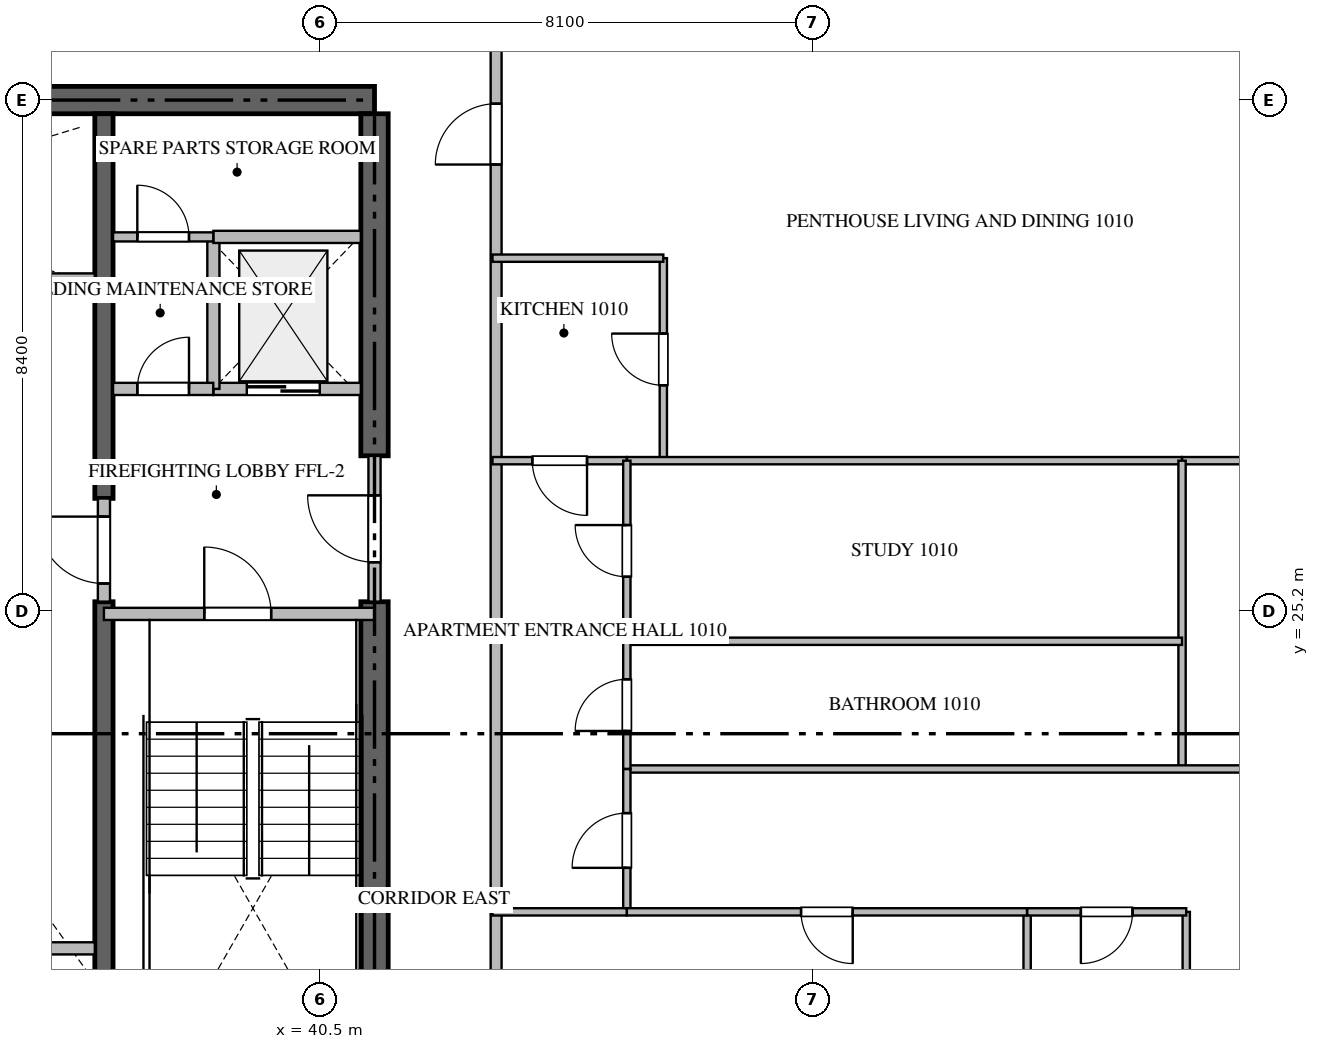
"""IFC4 building model, lengths in metres.
Left out: names, types, materials, properties, quantities, classifications, styles, units other than length and angle.
Written with IfcOpenShell. Run it as: python <this file> out.ifc"""

import sys

from ifc_helpers import new_model, si_unit, direction, frame, frame_2d, origin, place, context, subcontext, project, spatial, rectangle, extrude, source, transform, mapped, element, fill, save


model = new_model("IFC4")
c1 = context("Model", 3, precision=1e-05, world=origin(), true_north=direction((0.0, 1.0)))
c2 = subcontext(c1, "Body", "Model", "MODEL_VIEW")
j1 = project(units=[si_unit("LENGTHUNIT", "METRE"), si_unit("PLANEANGLEUNIT", "RADIAN")], contexts=[c1])
p1 = place(None, origin())
s1 = spatial("IfcSite", under=j1, at=p1, CompositionType="ELEMENT")
p2 = place(p1, origin())
s2 = spatial("IfcBuilding", under=s1, at=p2, CompositionType="ELEMENT")
p3 = place(p2, frame((0.0, 0.0, 45.45)))
s3 = spatial("IfcBuildingStorey", under=s2, at=p3, CompositionType="ELEMENT", Elevation=45.45)
p4 = place(p3, frame((41.4, 33.6, -0.26), z_axis=(0.0, 0.0, 1.0), x_axis=(-1.0, 0.0, 0.0)))
e1 = element("IfcWall", 1, at=p4, inside=s3, PredefinedType="SHEAR", context=c2, shape_type="SweptSolid", body=[
    extrude(rectangle(XDim=18.0, YDim=0.45, at=frame_2d((9.0, 0.0))), origin(), (0.0, 0.0, 1.0), 3.748),
])
p5 = place(p3, frame((41.4, 17.025, -0.26), z_axis=(0.0, 0.0, 1.0), x_axis=(0.0, 1.0, 0.0)))
e2 = element("IfcWall", 2, at=p5, inside=s3, PredefinedType="SHEAR", context=c2, shape_type="SweptSolid", body=[
    extrude(rectangle(XDim=8.325, YDim=0.45, at=frame_2d((4.163, 0.0))), origin(), (0.0, 0.0, 1.0), 3.748),
])
p6 = place(p3, frame((41.4, 27.75, -0.26), z_axis=(0.0, 0.0, 1.0), x_axis=(0.0, 1.0, 0.0)))
e3 = element("IfcWall", 3, at=p6, inside=s3, PredefinedType="SHEAR", context=c2, shape_type="SweptSolid", body=[
    extrude(rectangle(XDim=5.625, YDim=0.45, at=frame_2d((2.812, 0.0))), origin(), (0.0, 0.0, 1.0), 3.748),
])
p7 = place(p3, frame((36.95, 17.025, -0.26), z_axis=(0.0, 0.0, 1.0), x_axis=(0.0, 1.0, 0.0)))
e4 = element("IfcWall", 4, at=p7, inside=s3, PredefinedType="SHEAR", context=c2, shape_type="SweptSolid", body=[
    extrude(rectangle(XDim=8.325, YDim=0.3, at=frame_2d((4.163, 0.0))), origin(), (0.0, 0.0, 1.0), 3.748),
])
p8 = place(p3, frame((36.95, 27.05, -0.26), z_axis=(0.0, 0.0, 1.0), x_axis=(0.0, 1.0, 0.0)))
e5 = element("IfcWall", 5, at=p8, inside=s3, PredefinedType="SHEAR", context=c2, shape_type="SweptSolid", body=[
    extrude(rectangle(XDim=6.325, YDim=0.3, at=frame_2d((3.163, 0.0))), origin(), (0.0, 0.0, 1.0), 3.748),
])
p9 = place(p3, frame((36.95, 25.15, 0.0), z_axis=(0.0, 0.0, 1.0), x_axis=(1.0, 0.0, 0.0)))
e6 = element("IfcWall", 6, at=p9, inside=s3, PredefinedType="STANDARD", context=c2, shape_type="SweptSolid", body=[
    extrude(rectangle(XDim=4.45, YDim=0.2, at=frame_2d((2.225, 0.0))), origin(), (0.0, 0.0, 1.0), 3.49),
])
p10 = place(p9, frame((1.65, 0.0, 0.0)))
e7 = element("IfcOpeningElement", 7, at=p10, cuts=e6, PredefinedType="OPENING", context=c2, shape_type="SweptSolid", body=[
    extrude(rectangle(XDim=1.1, YDim=2.15, at=frame_2d((0.55, 1.075))), frame((0.0, 0.11, 0.0), z_axis=(0.0, -1.0, 0.0), x_axis=(1.0, 0.0, 0.0)), (0.0, 0.0, 1.0), 0.22),
])
p11 = place(p3, frame((38.75, 28.85, 0.0), z_axis=(0.0, 0.0, 1.0), x_axis=(1.0, 0.0, 0.0)))
e8 = element("IfcWall", 8, at=p11, inside=s3, PredefinedType="STANDARD", context=c2, shape_type="SweptSolid", body=[
    extrude(rectangle(XDim=2.425, YDim=0.2, at=frame_2d((1.212, 0.0))), origin(), (0.0, 0.0, 1.0), 3.49),
])
p12 = place(p11, frame((0.55, 0.0, 0.0)))
e9 = element("IfcOpeningElement", 9, at=p12, cuts=e8, PredefinedType="OPENING", context=c2, shape_type="SweptSolid", body=[
    extrude(rectangle(XDim=1.2, YDim=2.2, at=frame_2d((0.6, 1.1))), frame((0.0, 0.11, 0.0), z_axis=(0.0, -1.0, 0.0), x_axis=(1.0, 0.0, 0.0)), (0.0, 0.0, 1.0), 0.22),
])
p13 = place(p3, frame((33.05, 19.65, 0.0), z_axis=(0.0, 0.0, 1.0), x_axis=(1.0, 0.0, 0.0)))
e10 = element("IfcWall", 10, at=p13, inside=s3, PredefinedType="STANDARD", context=c2, shape_type="SweptSolid", body=[
    extrude(rectangle(XDim=3.75, YDim=0.2, at=frame_2d((1.875, 0.0))), origin(), (0.0, 0.0, 1.0), 3.49),
])
p14 = place(p13, frame((0.65, 0.0, 0.0)))
e11 = element("IfcOpeningElement", 11, at=p14, cuts=e10, PredefinedType="OPENING", context=c2, shape_type="SweptSolid", body=[
    extrude(rectangle(XDim=1.1, YDim=2.2, at=frame_2d((0.55, 1.1))), frame((0.0, 0.11, 0.0), z_axis=(0.0, -1.0, 0.0), x_axis=(1.0, 0.0, 0.0)), (0.0, 0.0, 1.0), 0.22),
])
p15 = place(p3, frame((35.0, 30.65, 0.0), z_axis=(0.0, 0.0, 1.0), x_axis=(1.0, 0.0, 0.0)))
e12 = element("IfcWall", 12, at=p15, inside=s3, PredefinedType="STANDARD", context=c2, shape_type="SweptSolid", body=[
    extrude(rectangle(XDim=1.8, YDim=0.2, at=frame_2d((0.9, 0.0))), origin(), (0.0, 0.0, 1.0), 3.49),
])
p16 = place(p3, frame((38.75, 28.85, 0.0), z_axis=(0.0, 0.0, 1.0), x_axis=(0.0, 1.0, 0.0)))
e13 = element("IfcWall", 13, at=p16, inside=s3, PredefinedType="STANDARD", context=c2, shape_type="SweptSolid", body=[
    extrude(rectangle(XDim=2.5, YDim=0.2, at=frame_2d((1.25, 0.0))), origin(), (0.0, 0.0, 1.0), 3.49),
])
p17 = place(p3, frame((38.75, 31.35, 0.0), z_axis=(0.0, 0.0, 1.0), x_axis=(1.0, 0.0, 0.0)))
e14 = element("IfcWall", 14, at=p17, inside=s3, PredefinedType="STANDARD", context=c2, shape_type="SweptSolid", body=[
    extrude(rectangle(XDim=2.425, YDim=0.2, at=frame_2d((1.212, 0.0))), origin(), (0.0, 0.0, 1.0), 3.49),
])
p18 = place(p3, frame((37.1, 28.85, 0.0), z_axis=(0.0, 0.0, 1.0), x_axis=(1.0, 0.0, 0.0)))
e15 = element("IfcWall", 15, at=p18, inside=s3, PredefinedType="STANDARD", context=c2, shape_type="SweptSolid", body=[
    extrude(rectangle(XDim=1.648, YDim=0.2, at=frame_2d((0.824, 0.0))), origin(), (0.0, 0.0, 1.0), 3.49),
])
p19 = place(p18, frame((0.399, 0.0, 0.0)))
e16 = element("IfcOpeningElement", 16, at=p19, cuts=e15, PredefinedType="OPENING", context=c2, shape_type="SweptSolid", body=[
    extrude(rectangle(XDim=0.85, YDim=2.1, at=frame_2d((0.425, 1.05))), frame((0.0, 0.11, 0.0), z_axis=(0.0, -1.0, 0.0), x_axis=(1.0, 0.0, 0.0)), (0.0, 0.0, 1.0), 0.22),
])
p20 = place(p3, frame((41.4, 25.352, 0.0), z_axis=(0.0, 0.0, 1.0), x_axis=(0.0, 1.0, 0.0)))
e17 = element("IfcWall", 17, at=p20, inside=s3, PredefinedType="STANDARD", context=c2, shape_type="SweptSolid", body=[
    extrude(rectangle(XDim=2.396, YDim=0.2, at=frame_2d((1.198, 0.0))), origin(), (0.0, 0.0, 1.0), 3.49),
])
p21 = place(p20, frame((0.648, 0.0, 0.0)))
e18 = element("IfcOpeningElement", 18, at=p21, cuts=e17, PredefinedType="OPENING", context=c2, shape_type="SweptSolid", body=[
    extrude(rectangle(XDim=1.1, YDim=2.15, at=frame_2d((0.55, 1.075))), frame((0.0, 0.11, 0.0), z_axis=(0.0, -1.0, 0.0), x_axis=(1.0, 0.0, 0.0)), (0.0, 0.0, 1.0), 0.22),
])
p22 = place(p3, frame((36.95, 25.352, 0.0), z_axis=(0.0, 0.0, 1.0), x_axis=(0.0, 1.0, 0.0)))
e19 = element("IfcWall", 19, at=p22, inside=s3, PredefinedType="STANDARD", context=c2, shape_type="SweptSolid", body=[
    extrude(rectangle(XDim=1.696, YDim=0.2, at=frame_2d((0.848, 0.0))), origin(), (0.0, 0.0, 1.0), 3.49),
])
p23 = place(p22, frame((0.298, 0.0, 0.0)))
e20 = element("IfcOpeningElement", 20, at=p23, cuts=e19, PredefinedType="OPENING", context=c2, shape_type="SweptSolid", body=[
    extrude(rectangle(XDim=1.1, YDim=2.15, at=frame_2d((0.55, 1.075))), frame((0.0, 0.11, 0.0), z_axis=(0.0, -1.0, 0.0), x_axis=(1.0, 0.0, 0.0)), (0.0, 0.0, 1.0), 0.22),
])
p24 = place(p3, frame((37.1, 31.35, 0.0), z_axis=(0.0, 0.0, 1.0), x_axis=(1.0, 0.0, 0.0)))
e21 = element("IfcWall", 21, at=p24, inside=s3, PredefinedType="PARTITIONING", context=c2, shape_type="SweptSolid", body=[
    extrude(rectangle(XDim=1.648, YDim=0.15, at=frame_2d((0.824, 0.0))), origin(), (0.0, 0.0, 1.0), 3.49),
])
p25 = place(p24, frame((0.399, 0.0, 0.0)))
e22 = element("IfcOpeningElement", 22, at=p25, cuts=e21, PredefinedType="OPENING", context=c2, shape_type="SweptSolid", body=[
    extrude(rectangle(XDim=0.85, YDim=2.1, at=frame_2d((0.425, 1.05))), frame((0.0, 0.085, 0.0), z_axis=(0.0, -1.0, 0.0), x_axis=(1.0, 0.0, 0.0)), (0.0, 0.0, 1.0), 0.17),
])
p26 = place(p3, frame((43.4, 14.9, 0.0), z_axis=(0.0, 0.0, 1.0), x_axis=(0.0, 1.0, 0.0)))
e23 = element("IfcWall", 23, at=p26, inside=s3, PredefinedType="PARTITIONING", context=c2, shape_type="SweptSolid", body=[
    extrude(rectangle(XDim=20.6, YDim=0.18, at=frame_2d((10.3, 0.0))), origin(), (0.0, 0.0, 1.0), 3.49),
])
p27 = place(p26, frame((17.64, 0.0, 0.0)))
e24 = element("IfcOpeningElement", 24, at=p27, cuts=e23, PredefinedType="OPENING", context=c2, shape_type="SweptSolid", body=[
    extrude(rectangle(XDim=1.0, YDim=2.15, at=frame_2d((0.5, 1.075))), frame((0.0, 0.1, 0.0), z_axis=(0.0, -1.0, 0.0), x_axis=(1.0, 0.0, 0.0)), (0.0, 0.0, 1.0), 0.2),
])
p28 = place(p3, frame((46.15, 27.67, 0.0), z_axis=(0.0, 0.0, 1.0), x_axis=(0.0, 1.0, 0.0)))
e25 = element("IfcWall", 25, at=p28, inside=s3, PredefinedType="PARTITIONING", context=c2, shape_type="SweptSolid", body=[
    extrude(rectangle(XDim=3.33, YDim=0.12, at=frame_2d((1.665, 0.0))), origin(), (0.0, 0.0, 1.0), 3.49),
])
p29 = place(p28, frame((1.24, 0.0, 0.0)))
e26 = element("IfcOpeningElement", 26, at=p29, cuts=e25, PredefinedType="OPENING", context=c2, shape_type="SweptSolid", body=[
    extrude(rectangle(XDim=0.85, YDim=2.1, at=frame_2d((0.425, 1.05))), frame((0.0, 0.07, 0.0), z_axis=(0.0, -1.0, 0.0), x_axis=(1.0, 0.0, 0.0)), (0.0, 0.0, 1.0), 0.14),
])
p30 = place(p3, frame((46.15, 31.0, 0.0), z_axis=(0.0, 0.0, 1.0), x_axis=(-1.0, 0.0, 0.0)))
e27 = element("IfcWall", 27, at=p30, inside=s3, PredefinedType="PARTITIONING", context=c2, shape_type="SweptSolid", body=[
    extrude(rectangle(XDim=2.81, YDim=0.12, at=frame_2d((1.405, 0.0))), origin(), (0.0, 0.0, 1.0), 3.49),
])
p31 = place(p3, frame((45.55, 27.67, 0.0), z_axis=(0.0, 0.0, 1.0), x_axis=(-1.0, 0.0, 0.0)))
e28 = element("IfcWall", 28, at=p31, inside=s3, PredefinedType="PARTITIONING", context=c2, shape_type="SweptSolid", body=[
    extrude(rectangle(XDim=2.21, YDim=0.12, at=frame_2d((1.105, 0.0))), origin(), (0.0, 0.0, 1.0), 3.49),
])
p32 = place(p31, frame((0.655, 0.0, 0.0)))
e29 = element("IfcOpeningElement", 29, at=p32, cuts=e28, PredefinedType="OPENING", context=c2, shape_type="SweptSolid", body=[
    extrude(rectangle(XDim=0.9, YDim=2.1, at=frame_2d((0.45, 1.05))), frame((0.0, 0.07, 0.0), z_axis=(0.0, -1.0, 0.0), x_axis=(1.0, 0.0, 0.0)), (0.0, 0.0, 1.0), 0.14),
])
p33 = place(p3, frame((58.705, 27.67, 0.0), z_axis=(0.0, 0.0, 1.0), x_axis=(-1.0, 0.0, 0.0)))
e30 = element("IfcWall", 30, at=p33, inside=s3, PredefinedType="PARTITIONING", context=c2, shape_type="SweptSolid", body=[
    extrude(rectangle(XDim=4.024, YDim=0.12, at=frame_2d((2.012, 0.0))), origin(), (0.0, 0.0, 1.0), 3.49),
])
p34 = place(p33, frame((1.858, 0.0, 0.0)))
e31 = element("IfcOpeningElement", 31, at=p34, cuts=e30, PredefinedType="OPENING", context=c2, shape_type="SweptSolid", body=[
    extrude(rectangle(XDim=0.9, YDim=2.1, at=frame_2d((0.45, 1.05))), frame((0.0, 0.07, 0.0), z_axis=(0.0, -1.0, 0.0), x_axis=(1.0, 0.0, 0.0)), (0.0, 0.0, 1.0), 0.14),
])
p35 = place(p3, frame((54.679, 27.67, 0.0), z_axis=(0.0, 0.0, 1.0), x_axis=(-1.0, 0.0, 0.0)))
e32 = element("IfcWall", 32, at=p35, inside=s3, PredefinedType="PARTITIONING", context=c2, shape_type="SweptSolid", body=[
    extrude(rectangle(XDim=9.127, YDim=0.12, at=frame_2d((4.563, 0.0))), origin(), (0.0, 0.0, 1.0), 3.49),
])
p36 = place(p3, frame((54.681, 22.6, 0.0), z_axis=(0.0, 0.0, 1.0), x_axis=(0.0, 1.0, 0.0)))
e33 = element("IfcWall", 33, at=p36, inside=s3, PredefinedType="PARTITIONING", context=c2, shape_type="SweptSolid", body=[
    extrude(rectangle(XDim=5.07, YDim=0.12, at=frame_2d((2.535, 0.0))), origin(), (0.0, 0.0, 1.0), 3.49),
])
p37 = place(p3, frame((58.705, 22.6, 0.0), z_axis=(0.0, 0.0, 1.0), x_axis=(-1.0, 0.0, 0.0)))
e34 = element("IfcWall", 34, at=p37, inside=s3, PredefinedType="PARTITIONING", context=c2, shape_type="SweptSolid", body=[
    extrude(rectangle(XDim=13.155, YDim=0.12, at=frame_2d((6.578, 0.0))), origin(), (0.0, 0.0, 1.0), 3.49),
])
p38 = place(p3, frame((54.681, 24.7, 0.0), z_axis=(0.0, 0.0, 1.0), x_axis=(-1.0, 0.0, 0.0)))
e35 = element("IfcWall", 35, at=p38, inside=s3, PredefinedType="PARTITIONING", context=c2, shape_type="SweptSolid", body=[
    extrude(rectangle(XDim=9.131, YDim=0.12, at=frame_2d((4.565, 0.0))), origin(), (0.0, 0.0, 1.0), 3.49),
])
p39 = place(p3, frame((45.55, 22.6, 0.0), z_axis=(0.0, 0.0, 1.0), x_axis=(0.0, 1.0, 0.0)))
e36 = element("IfcWall", 36, at=p39, inside=s3, PredefinedType="PARTITIONING", context=c2, shape_type="SweptSolid", body=[
    extrude(rectangle(XDim=2.1, YDim=0.12, at=frame_2d((1.05, 0.0))), origin(), (0.0, 0.0, 1.0), 3.49),
])
p40 = place(p39, frame((0.625, 0.0, 0.0)))
e37 = element("IfcOpeningElement", 37, at=p40, cuts=e36, PredefinedType="OPENING", context=c2, shape_type="SweptSolid", body=[
    extrude(rectangle(XDim=0.85, YDim=2.1, at=frame_2d((0.425, 1.05))), frame((0.0, 0.07, 0.0), z_axis=(0.0, -1.0, 0.0), x_axis=(1.0, 0.0, 0.0)), (0.0, 0.0, 1.0), 0.14),
])
p41 = place(p3, frame((45.55, 24.702, 0.0), z_axis=(0.0, 0.0, 1.0), x_axis=(0.0, 1.0, 0.0)))
e38 = element("IfcWall", 38, at=p41, inside=s3, PredefinedType="PARTITIONING", context=c2, shape_type="SweptSolid", body=[
    extrude(rectangle(XDim=2.968, YDim=0.12, at=frame_2d((1.484, 0.0))), origin(), (0.0, 0.0, 1.0), 3.49),
])
p42 = place(p41, frame((1.059, 0.0, 0.0)))
e39 = element("IfcOpeningElement", 39, at=p42, cuts=e38, PredefinedType="OPENING", context=c2, shape_type="SweptSolid", body=[
    extrude(rectangle(XDim=0.85, YDim=2.1, at=frame_2d((0.425, 1.05))), frame((0.0, 0.07, 0.0), z_axis=(0.0, -1.0, 0.0), x_axis=(1.0, 0.0, 0.0)), (0.0, 0.0, 1.0), 0.14),
])
p43 = place(p3, frame((45.55, 20.25, 0.0), z_axis=(0.0, 0.0, 1.0), x_axis=(0.0, 1.0, 0.0)))
e40 = element("IfcWall", 40, at=p43, inside=s3, PredefinedType="PARTITIONING", context=c2, shape_type="SweptSolid", body=[
    extrude(rectangle(XDim=2.348, YDim=0.12, at=frame_2d((1.174, 0.0))), origin(), (0.0, 0.0, 1.0), 3.49),
])
p44 = place(p43, frame((0.724, 0.0, 0.0)))
e41 = element("IfcOpeningElement", 41, at=p44, cuts=e40, PredefinedType="OPENING", context=c2, shape_type="SweptSolid", body=[
    extrude(rectangle(XDim=0.9, YDim=2.1, at=frame_2d((0.45, 1.05))), frame((0.0, 0.07, 0.0), z_axis=(0.0, -1.0, 0.0), x_axis=(1.0, 0.0, 0.0)), (0.0, 0.0, 1.0), 0.14),
])
for number, where, z_axis, x_axis in (
    (42, (54.75, 14.84, 0.0), (0.0, 0.0, 1.0), (0.0, 1.0, 0.0)),
    (43, (52.133, 14.84, 0.0), (0.0, 0.0, 1.0), (0.0, 1.0, 0.0)),
):
    element("IfcWall", number, at=place(p3, frame(where, z_axis=z_axis, x_axis=x_axis)), inside=s3, PredefinedType="PARTITIONING", context=c2, shape_type="SweptSolid", body=[
        extrude(rectangle(XDim=5.41, YDim=0.12, at=frame_2d((2.705, 0.0))), origin(), (0.0, 0.0, 1.0), 3.49),
    ])
p45 = place(p3, frame((54.75, 20.25, 0.0), z_axis=(0.0, 0.0, 1.0), x_axis=(-1.0, 0.0, 0.0)))
e44 = element("IfcWall", 44, at=p45, inside=s3, PredefinedType="PARTITIONING", context=c2, shape_type="SweptSolid", body=[
    extrude(rectangle(XDim=2.617, YDim=0.12, at=frame_2d((1.309, 0.0))), origin(), (0.0, 0.0, 1.0), 3.49),
])
p46 = place(p45, frame((0.883, 0.0, 0.0)))
e45 = element("IfcOpeningElement", 45, at=p46, cuts=e44, PredefinedType="OPENING", context=c2, shape_type="SweptSolid", body=[
    extrude(rectangle(XDim=0.85, YDim=2.1, at=frame_2d((0.425, 1.05))), frame((0.0, 0.07, 0.0), z_axis=(0.0, -1.0, 0.0), x_axis=(1.0, 0.0, 0.0)), (0.0, 0.0, 1.0), 0.14),
])
p47 = place(p3, frame((52.131, 20.25, 0.0), z_axis=(0.0, 0.0, 1.0), x_axis=(-1.0, 0.0, 0.0)))
e46 = element("IfcWall", 46, at=p47, inside=s3, PredefinedType="PARTITIONING", context=c2, shape_type="SweptSolid", body=[
    extrude(rectangle(XDim=6.581, YDim=0.12, at=frame_2d((3.291, 0.0))), origin(), (0.0, 0.0, 1.0), 3.49),
])
p48 = place(p47, frame((2.866, 0.0, 0.0)))
e47 = element("IfcOpeningElement", 47, at=p48, cuts=e46, PredefinedType="OPENING", context=c2, shape_type="SweptSolid", body=[
    extrude(rectangle(XDim=0.85, YDim=2.1, at=frame_2d((0.425, 1.05))), frame((0.0, 0.07, 0.0), z_axis=(0.0, -1.0, 0.0), x_axis=(1.0, 0.0, 0.0)), (0.0, 0.0, 1.0), 0.14),
])
p49 = place(p3, frame((45.548, 20.25, 0.0), z_axis=(0.0, 0.0, 1.0), x_axis=(-1.0, 0.0, 0.0)))
e48 = element("IfcWall", 48, at=p49, inside=s3, PredefinedType="PARTITIONING", context=c2, shape_type="SweptSolid", body=[
    extrude(rectangle(XDim=2.208, YDim=0.12, at=frame_2d((1.104, 0.0))), origin(), (0.0, 0.0, 1.0), 3.49),
])
m1 = source(origin(), c2, "Body", "SweptSolid", [
    extrude(rectangle(XDim=1.1, YDim=2.15, at=frame_2d((0.55, 1.075))), frame((0.0, 0.025, 0.0), z_axis=(0.0, -1.0, 0.0), x_axis=(1.0, 0.0, 0.0)), (0.0, 0.0, 1.0), 0.05),
])
p50 = place(p10, origin())
e49 = element("IfcDoor", 49, at=p50, inside=s3, OperationType="SINGLE_SWING_LEFT", PredefinedType="DOOR", context=c2, shape_type="MappedRepresentation", body=[
    mapped(m1, transform((0.0, 0.0, 0.0), scale=1.0)),
])
fill(e7, e49)
m2 = source(origin(), c2, "Body", "SweptSolid", [
    extrude(rectangle(XDim=1.2, YDim=2.2, at=frame_2d((0.6, 1.1))), frame((0.0, 0.025, 0.0), z_axis=(0.0, -1.0, 0.0), x_axis=(1.0, 0.0, 0.0)), (0.0, 0.0, 1.0), 0.05),
])
p51 = place(p12, origin())
e50 = element("IfcDoor", 50, at=p51, inside=s3, OperationType="DOUBLE_DOOR_SLIDING", PredefinedType="DOOR", context=c2, shape_type="MappedRepresentation", body=[
    mapped(m2, transform((0.0, 0.0, 0.0), scale=1.0)),
])
fill(e9, e50)
m3 = source(origin(), c2, "Body", "SweptSolid", [
    extrude(rectangle(XDim=0.85, YDim=2.1, at=frame_2d((0.425, 1.05))), frame((0.0, 0.025, 0.0), z_axis=(0.0, -1.0, 0.0), x_axis=(1.0, 0.0, 0.0)), (0.0, 0.0, 1.0), 0.05),
])
p52 = place(p19, origin())
e51 = element("IfcDoor", 51, at=p52, inside=s3, OperationType="SINGLE_SWING_RIGHT", PredefinedType="DOOR", context=c2, shape_type="MappedRepresentation", body=[
    mapped(m3, transform((0.0, 0.0, 0.0), scale=1.0)),
])
fill(e16, e51)
p53 = place(p21, origin())
e52 = element("IfcDoor", 52, at=p53, inside=s3, OperationType="SINGLE_SWING_RIGHT", PredefinedType="DOOR", context=c2, shape_type="MappedRepresentation", body=[
    mapped(m1, transform((0.0, 0.0, 0.0), scale=1.0)),
])
fill(e18, e52)
p54 = place(p23, origin())
e53 = element("IfcDoor", 53, at=p54, inside=s3, OperationType="SINGLE_SWING_RIGHT", PredefinedType="DOOR", context=c2, shape_type="MappedRepresentation", body=[
    mapped(m1, transform((0.0, 0.0, 0.0), scale=1.0)),
])
fill(e20, e53)
p55 = place(p25, origin())
e54 = element("IfcDoor", 54, at=p55, inside=s3, OperationType="SINGLE_SWING_LEFT", PredefinedType="DOOR", context=c2, shape_type="MappedRepresentation", body=[
    mapped(m3, transform((0.0, 0.0, 0.0), scale=1.0)),
])
fill(e22, e54)
m4 = source(origin(), c2, "Body", "SweptSolid", [
    extrude(rectangle(XDim=1.0, YDim=2.15, at=frame_2d((0.5, 1.075))), frame((0.0, 0.025, 0.0), z_axis=(0.0, -1.0, 0.0), x_axis=(1.0, 0.0, 0.0)), (0.0, 0.0, 1.0), 0.05),
])
p56 = place(p27, origin())
e55 = element("IfcDoor", 55, at=p56, inside=s3, OperationType="SINGLE_SWING_LEFT", PredefinedType="DOOR", context=c2, shape_type="MappedRepresentation", body=[
    mapped(m4, transform((0.0, 0.0, 0.0), scale=1.0)),
])
fill(e24, e55)
p57 = place(p29, origin())
e56 = element("IfcDoor", 56, at=p57, inside=s3, OperationType="SINGLE_SWING_RIGHT", PredefinedType="DOOR", context=c2, shape_type="MappedRepresentation", body=[
    mapped(m3, transform((0.0, 0.0, 0.0), scale=1.0)),
])
fill(e26, e56)
m5 = source(origin(), c2, "Body", "SweptSolid", [
    extrude(rectangle(XDim=0.9, YDim=2.1, at=frame_2d((0.45, 1.05))), frame((0.0, 0.025, 0.0), z_axis=(0.0, -1.0, 0.0), x_axis=(1.0, 0.0, 0.0)), (0.0, 0.0, 1.0), 0.05),
])
p58 = place(p32, origin())
e57 = element("IfcDoor", 57, at=p58, inside=s3, OperationType="SINGLE_SWING_LEFT", PredefinedType="DOOR", context=c2, shape_type="MappedRepresentation", body=[
    mapped(m5, transform((0.0, 0.0, 0.0), scale=1.0)),
])
fill(e29, e57)
p59 = place(p40, origin())
e58 = element("IfcDoor", 58, at=p59, inside=s3, OperationType="SINGLE_SWING_LEFT", PredefinedType="DOOR", context=c2, shape_type="MappedRepresentation", body=[
    mapped(m3, transform((0.0, 0.0, 0.0), scale=1.0)),
])
fill(e37, e58)
p60 = place(p42, origin())
e59 = element("IfcDoor", 59, at=p60, inside=s3, OperationType="SINGLE_SWING_RIGHT", PredefinedType="DOOR", context=c2, shape_type="MappedRepresentation", body=[
    mapped(m3, transform((0.0, 0.0, 0.0), scale=1.0)),
])
fill(e39, e59)
p61 = place(p44, origin())
e60 = element("IfcDoor", 60, at=p61, inside=s3, OperationType="SINGLE_SWING_LEFT", PredefinedType="DOOR", context=c2, shape_type="MappedRepresentation", body=[
    mapped(m5, transform((0.0, 0.0, 0.0), scale=1.0)),
])
fill(e41, e60)
p62 = place(p46, origin())
e61 = element("IfcDoor", 61, at=p62, inside=s3, OperationType="SINGLE_SWING_RIGHT", PredefinedType="DOOR", context=c2, shape_type="MappedRepresentation", body=[
    mapped(m3, transform((0.0, 0.0, 0.0), scale=1.0)),
])
fill(e45, e61)
p63 = place(p48, origin())
e62 = element("IfcDoor", 62, at=p63, inside=s3, OperationType="SINGLE_SWING_LEFT", PredefinedType="DOOR", context=c2, shape_type="MappedRepresentation", body=[
    mapped(m3, transform((0.0, 0.0, 0.0), scale=1.0)),
])
fill(e47, e62)
save(model, sys.argv[1])
